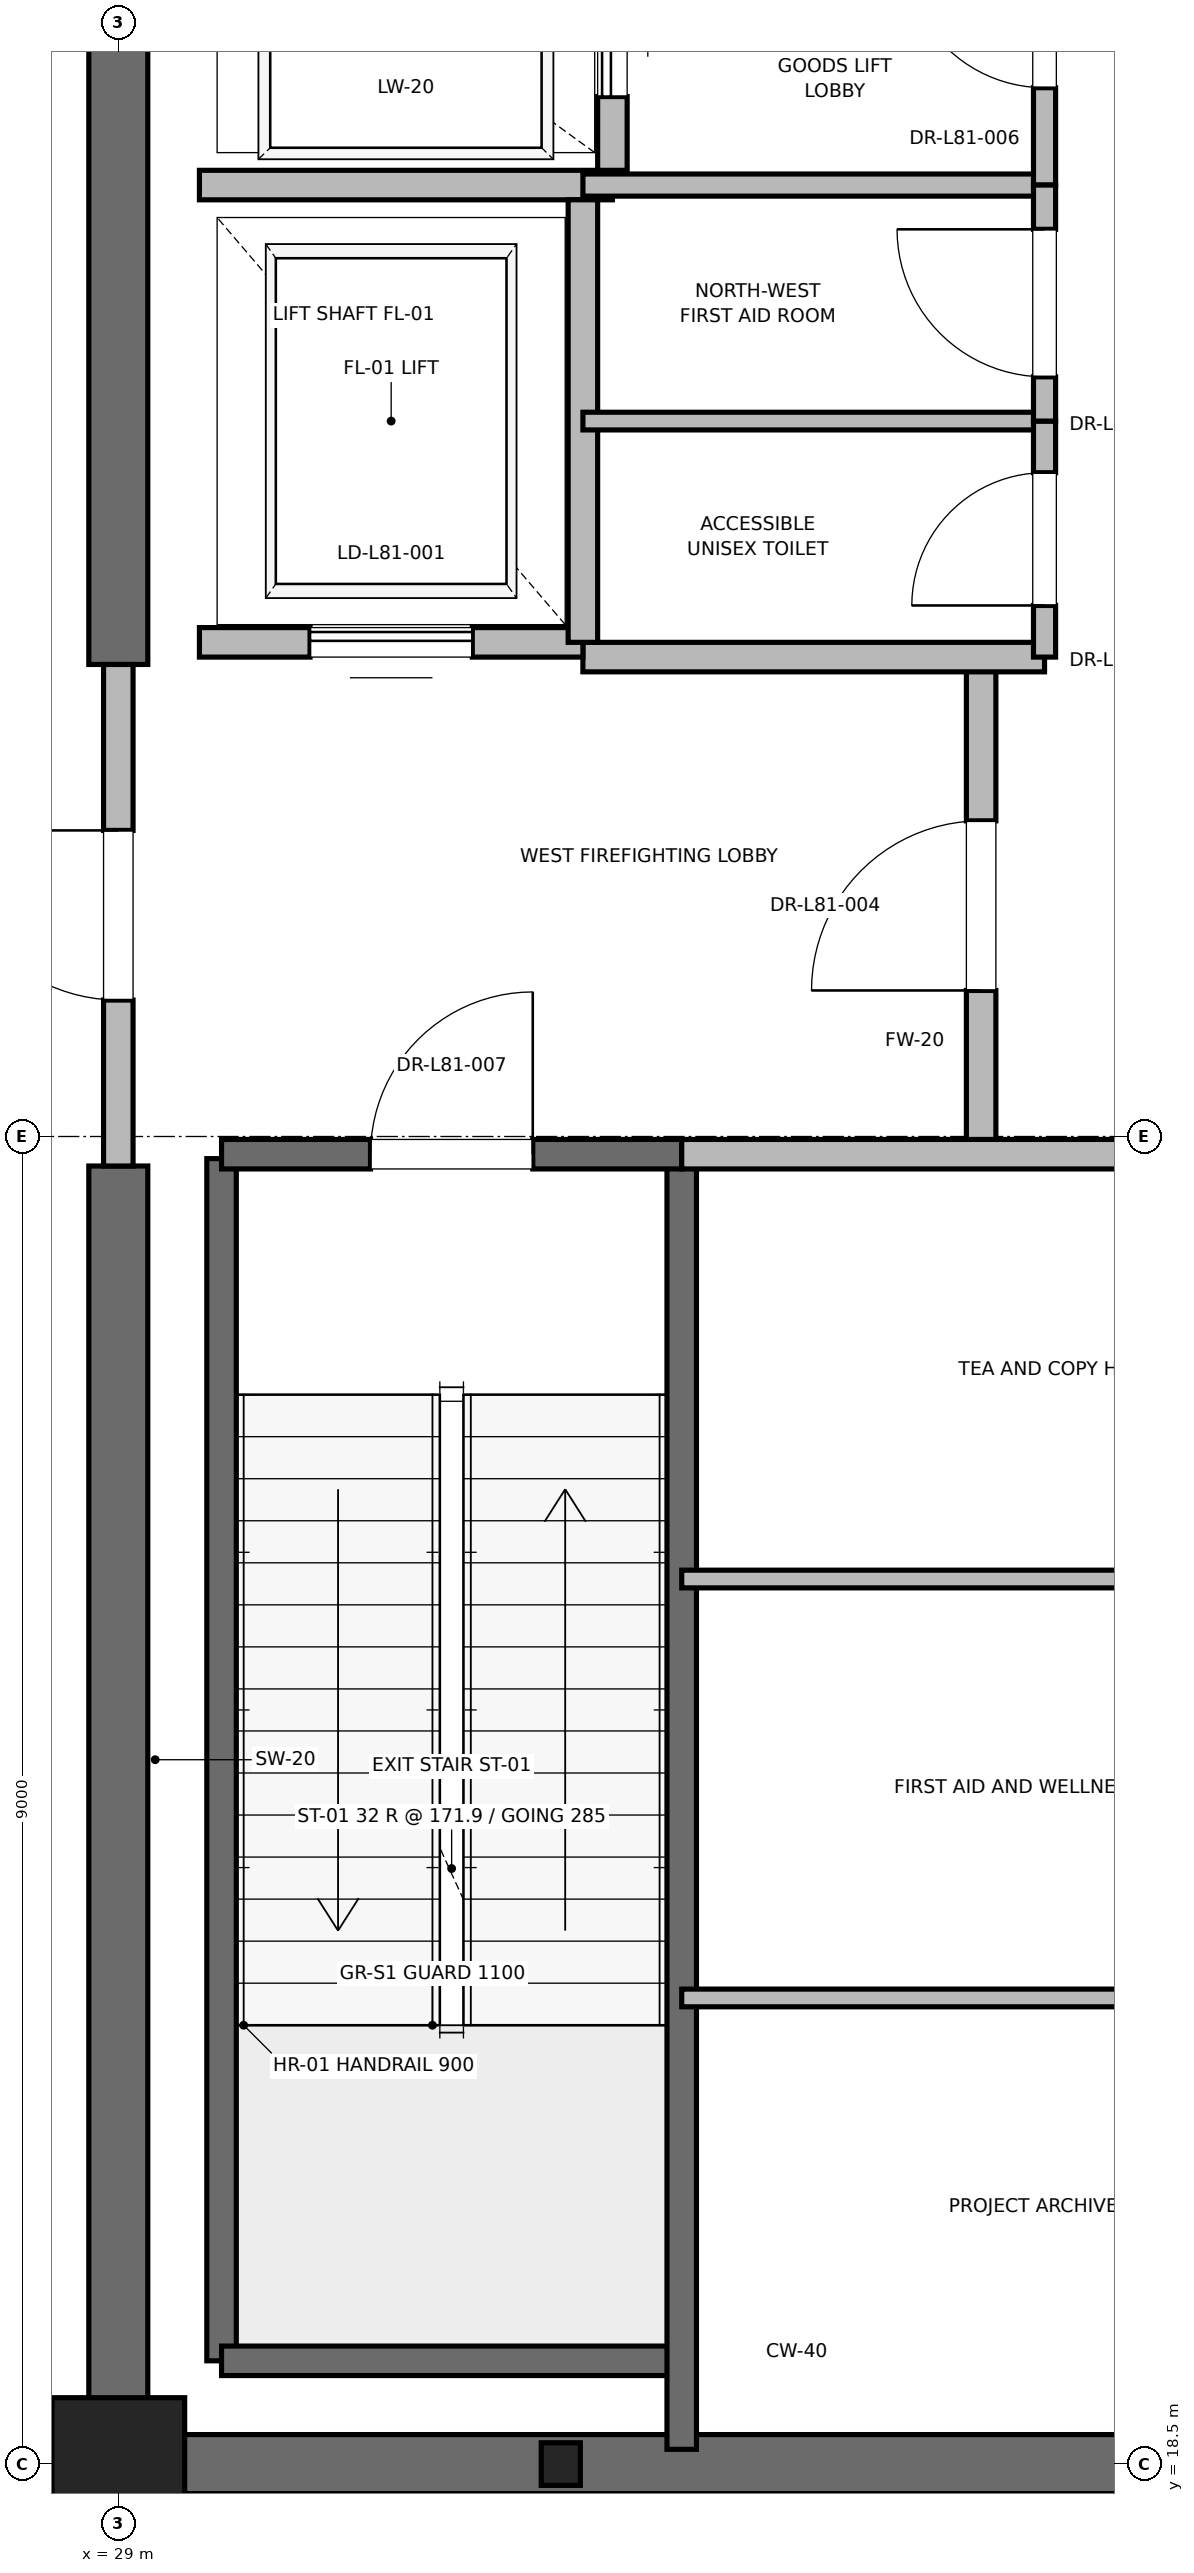
"""IFC4 building model, lengths in metres.
Left out: names, types, materials, properties, quantities, classifications, styles, units other than length and angle.
Written with IfcOpenShell. Run it as: python <this file> out.ifc"""

import sys

from ifc_helpers import new_model, si_unit, direction, frame, frame_2d, origin, origin_2d, place, context, subcontext, project, spatial, rectangle, i_section, extrude, element, fill, save


model = new_model("IFC4")
c1 = context("Model", 3, precision=1e-05, world=origin(), true_north=direction((0.0, 1.0)))
c2 = subcontext(c1, "Body", "Model", "MODEL_VIEW")
j1 = project(units=[si_unit("LENGTHUNIT", "METRE"), si_unit("PLANEANGLEUNIT", "RADIAN")], contexts=[c1])
p1 = place(None, origin())
s1 = spatial("IfcSite", under=j1, at=p1, CompositionType="ELEMENT")
p2 = place(p1, origin())
s2 = spatial("IfcBuilding", under=s1, at=p2, CompositionType="ELEMENT")
p3 = place(p2, frame((0.0, 0.0, 348.8)))
s3 = spatial("IfcBuildingStorey", under=s2, at=p3, CompositionType="ELEMENT", Elevation=348.8)
p4 = place(p3, frame((29.0, 18.5, 0.0), z_axis=(0.0, 0.0, 1.0), x_axis=(1.0, 0.0, 0.0)))
e1 = element("IfcColumn", 1, at=p4, inside=s3, PredefinedType="PILASTER", context=c2, shape_type="SweptSolid", body=[
    extrude(rectangle(XDim=0.9, YDim=0.9, at=origin_2d()), origin(), (0.0, 0.0, 1.0), 5.5),
])
p5 = place(p3, frame((32.0, 18.5, 0.0), z_axis=(0.0, 0.0, 1.0), x_axis=(1.0, 0.0, 0.0)))
e2 = element("IfcColumn", 2, at=p5, inside=s3, PredefinedType="COLUMN", context=c2, shape_type="SweptSolid", body=[
    extrude(i_section(OverallWidth=0.265, OverallDepth=0.289, WebThickness=0.019, FlangeThickness=0.032, FilletRadius=0.013, at=origin_2d()), origin(), (0.0, 0.0, 1.0), 5.5),
])
p6 = place(p3, frame((29.0, 18.5, 0.0), z_axis=(0.0, 0.0, 1.0), x_axis=(1.0, 0.0, 0.0)))
e3 = element("IfcWall", 3, at=p6, inside=s3, PredefinedType="SHEAR", context=c2, shape_type="SweptSolid", body=[
    extrude(rectangle(XDim=9.2, YDim=0.4, at=frame_2d((4.6, 0.0))), origin(), (0.0, 0.0, 1.0), 5.2),
])
p7 = place(p3, frame((29.0, 18.5, 0.0), z_axis=(0.0, 0.0, 1.0), x_axis=(0.0, 1.0, 0.0)))
e4 = element("IfcWall", 4, at=p7, inside=s3, PredefinedType="SHEAR", context=c2, shape_type="SweptSolid", body=[
    extrude(rectangle(XDim=8.8, YDim=0.4, at=frame_2d((4.4, 0.0))), origin(), (0.0, 0.0, 1.0), 5.2),
])
p8 = place(p3, frame((29.0, 30.7, 0.0), z_axis=(0.0, 0.0, 1.0), x_axis=(0.0, 1.0, 0.0)))
e5 = element("IfcWall", 5, at=p8, inside=s3, PredefinedType="SHEAR", context=c2, shape_type="SweptSolid", body=[
    extrude(rectangle(XDim=5.8, YDim=0.4, at=frame_2d((2.9, 0.0))), origin(), (0.0, 0.0, 1.0), 5.2),
])
p9 = place(p3, frame((29.7, 19.2, 0.0), z_axis=(0.0, 0.0, 1.0), x_axis=(0.0, 1.0, 0.0)))
e6 = element("IfcWall", 6, at=p9, inside=s3, PredefinedType="SOLIDWALL", context=c2, shape_type="SweptSolid", body=[
    extrude(rectangle(XDim=8.15, YDim=0.2, at=frame_2d((4.075, 0.0))), origin(), (0.0, 0.0, 1.0), 5.2),
])
p10 = place(p3, frame((29.7, 19.2, 0.0), z_axis=(0.0, 0.0, 1.0), x_axis=(1.0, 0.0, 0.0)))
e7 = element("IfcWall", 7, at=p10, inside=s3, PredefinedType="SOLIDWALL", context=c2, shape_type="SweptSolid", body=[
    extrude(rectangle(XDim=3.12, YDim=0.2, at=frame_2d((1.56, 0.0))), origin(), (0.0, 0.0, 1.0), 5.2),
])
p11 = place(p3, frame((32.82, 18.6, 0.0), z_axis=(0.0, 0.0, 1.0), x_axis=(0.0, 1.0, 0.0)))
e8 = element("IfcWall", 8, at=p11, inside=s3, PredefinedType="SOLIDWALL", context=c2, shape_type="SweptSolid", body=[
    extrude(rectangle(XDim=8.78, YDim=0.2, at=frame_2d((4.39, 0.0))), origin(), (0.0, 0.0, 1.0), 5.2),
])
p12 = place(p3, frame((29.7, 27.38, 0.0), z_axis=(0.0, 0.0, 1.0), x_axis=(1.0, 0.0, 0.0)))
e9 = element("IfcWall", 9, at=p12, inside=s3, PredefinedType="SOLIDWALL", context=c2, shape_type="SweptSolid", body=[
    extrude(rectangle(XDim=3.12, YDim=0.2, at=frame_2d((1.56, 0.0))), origin(), (0.0, 0.0, 1.0), 5.2),
])
p13 = place(p12, frame((1.01, 0.0, 0.0)))
e10 = element("IfcOpeningElement", 10, at=p13, cuts=e9, PredefinedType="OPENING", context=c2, shape_type="SweptSolid", body=[
    extrude(rectangle(XDim=1.1, YDim=2.15, at=frame_2d((0.55, 1.075))), frame((0.0, 0.1, 0.0), z_axis=(0.0, -1.0, 0.0), x_axis=(1.0, 0.0, 0.0)), (0.0, 0.0, 1.0), 0.2),
])
p14 = place(p3, frame((34.85, 27.38, 0.0), z_axis=(0.0, 0.0, 1.0), x_axis=(0.0, 1.0, 0.0)))
e11 = element("IfcWall", 11, at=p14, inside=s3, PredefinedType="PARTITIONING", context=c2, shape_type="SweptSolid", body=[
    extrude(rectangle(XDim=3.37, YDim=0.2, at=frame_2d((1.685, 0.0))), origin(), (0.0, 0.0, 1.0), 5.2),
])
p15 = place(p14, frame((1.11, 0.0, 0.0)))
e12 = element("IfcOpeningElement", 12, at=p15, cuts=e11, PredefinedType="OPENING", context=c2, shape_type="SweptSolid", body=[
    extrude(rectangle(XDim=1.15, YDim=2.2, at=frame_2d((0.575, 1.1))), frame((0.0, 0.1, 0.0), z_axis=(0.0, -1.0, 0.0), x_axis=(1.0, 0.0, 0.0)), (0.0, 0.0, 1.0), 0.2),
])
p16 = place(p3, frame((29.0, 27.3, 0.0), z_axis=(0.0, 0.0, 1.0), x_axis=(0.0, 1.0, 0.0)))
e13 = element("IfcWall", 13, at=p16, inside=s3, PredefinedType="PARTITIONING", context=c2, shape_type="SweptSolid", body=[
    extrude(rectangle(XDim=3.4, YDim=0.2, at=frame_2d((1.7, 0.0))), origin(), (0.0, 0.0, 1.0), 4.28),
])
p17 = place(p16, frame((1.125, 0.0, 0.0)))
e14 = element("IfcOpeningElement", 14, at=p17, cuts=e13, PredefinedType="OPENING", context=c2, shape_type="SweptSolid", body=[
    extrude(rectangle(XDim=1.15, YDim=2.2, at=frame_2d((0.575, 1.1))), frame((0.0, 0.1, 0.0), z_axis=(0.0, -1.0, 0.0), x_axis=(1.0, 0.0, 0.0)), (0.0, 0.0, 1.0), 0.2),
])
p18 = place(p3, frame((32.82, 27.38, 0.0), z_axis=(0.0, 0.0, 1.0), x_axis=(1.0, 0.0, 0.0)))
e15 = element("IfcWall", 15, at=p18, inside=s3, PredefinedType="PARTITIONING", context=c2, shape_type="SweptSolid", body=[
    extrude(rectangle(XDim=5.62, YDim=0.2, at=frame_2d((2.81, 0.0))), origin(), (0.0, 0.0, 1.0), 5.2),
])
p19 = place(p3, frame((32.15, 30.75, 0.0), z_axis=(0.0, 0.0, 1.0), x_axis=(1.0, 0.0, 0.0)))
e16 = element("IfcWall", 16, at=p19, inside=s3, PredefinedType="PARTITIONING", context=c2, shape_type="SweptSolid", body=[
    extrude(rectangle(XDim=3.13, YDim=0.2, at=frame_2d((1.565, 0.0))), origin(), (0.0, 0.0, 1.0), 5.2),
])
p20 = place(p3, frame((29.55, 30.85, 0.0), z_axis=(0.0, 0.0, 1.0), x_axis=(1.0, 0.0, 0.0)))
e17 = element("IfcWall", 17, at=p20, inside=s3, PredefinedType="SOLIDWALL", context=c2, shape_type="SweptSolid", body=[
    extrude(rectangle(XDim=2.6, YDim=0.2, at=frame_2d((1.3, 0.0))), origin(), (0.0, 0.0, 1.0), 4.28),
])
p21 = place(p20, frame((0.75, 0.0, 0.0)))
e18 = element("IfcOpeningElement", 18, at=p21, cuts=e17, PredefinedType="OPENING", context=c2, shape_type="SweptSolid", body=[
    extrude(rectangle(XDim=1.1, YDim=2.2, at=frame_2d((0.55, 1.1))), frame((0.0, 0.1, 0.0), z_axis=(0.0, -1.0, 0.0), x_axis=(1.0, 0.0, 0.0)), (0.0, 0.0, 1.0), 0.2),
])
p22 = place(p3, frame((29.55, 33.95, 0.0), z_axis=(0.0, 0.0, 1.0), x_axis=(1.0, 0.0, 0.0)))
e19 = element("IfcWall", 19, at=p22, inside=s3, PredefinedType="SOLIDWALL", context=c2, shape_type="SweptSolid", body=[
    extrude(rectangle(XDim=2.8, YDim=0.2, at=frame_2d((1.4, 0.0))), origin(), (0.0, 0.0, 1.0), 5.2),
])
p23 = place(p3, frame((32.15, 30.85, 0.0), z_axis=(0.0, 0.0, 1.0), x_axis=(0.0, 1.0, 0.0)))
e20 = element("IfcWall", 20, at=p23, inside=s3, PredefinedType="SOLIDWALL", context=c2, shape_type="SweptSolid", body=[
    extrude(rectangle(XDim=3.0, YDim=0.2, at=frame_2d((1.5, 0.0))), origin(), (0.0, 0.0, 1.0), 5.2),
])
p24 = place(p3, frame((32.35, 34.05, 0.0), z_axis=(0.0, 0.0, 1.0), x_axis=(0.0, 1.0, 0.0)))
e21 = element("IfcWall", 21, at=p24, inside=s3, PredefinedType="SOLIDWALL", context=c2, shape_type="SweptSolid", body=[
    extrude(rectangle(XDim=2.1, YDim=0.2, at=frame_2d((1.05, 0.0))), origin(), (0.0, 0.0, 1.0), 5.2),
])
p25 = place(p24, frame((0.5, 0.0, 0.0)))
e22 = element("IfcOpeningElement", 22, at=p25, cuts=e21, PredefinedType="OPENING", context=c2, shape_type="SweptSolid", body=[
    extrude(rectangle(XDim=1.1, YDim=2.2, at=frame_2d((0.55, 1.1))), frame((0.0, 0.1, 0.0), z_axis=(0.0, -1.0, 0.0), x_axis=(1.0, 0.0, 0.0)), (0.0, 0.0, 1.0), 0.2),
])
p26 = place(p3, frame((32.15, 33.95, 0.0), z_axis=(0.0, 0.0, 1.0), x_axis=(1.0, 0.0, 0.0)))
e23 = element("IfcWall", 23, at=p26, inside=s3, PredefinedType="PARTITIONING", context=c2, shape_type="SweptSolid", body=[
    extrude(rectangle(XDim=3.13, YDim=0.15, at=frame_2d((1.565, 0.0))), origin(), (0.0, 0.0, 1.0), 2.85),
])
p27 = place(p3, frame((35.28, 33.95, 0.0), z_axis=(0.0, 0.0, 1.0), x_axis=(0.0, 1.0, 0.0)))
e24 = element("IfcWall", 24, at=p27, inside=s3, PredefinedType="PARTITIONING", context=c2, shape_type="SweptSolid", body=[
    extrude(rectangle(XDim=2.27, YDim=0.15, at=frame_2d((1.135, 0.0))), origin(), (0.0, 0.0, 1.0), 2.85),
])
p28 = place(p27, frame((0.66, 0.0, 0.0)))
e25 = element("IfcOpeningElement", 25, at=p28, cuts=e24, PredefinedType="OPENING", context=c2, shape_type="SweptSolid", body=[
    extrude(rectangle(XDim=0.95, YDim=2.15, at=frame_2d((0.475, 1.075))), frame((0.0, 0.075, 0.0), z_axis=(0.0, -1.0, 0.0), x_axis=(1.0, 0.0, 0.0)), (0.0, 0.0, 1.0), 0.15),
])
p29 = place(p3, frame((32.15, 32.35, 0.0), z_axis=(0.0, 0.0, 1.0), x_axis=(1.0, 0.0, 0.0)))
e26 = element("IfcWall", 26, at=p29, inside=s3, PredefinedType="PARTITIONING", context=c2, shape_type="SweptSolid", body=[
    extrude(rectangle(XDim=3.13, YDim=0.12, at=frame_2d((1.565, 0.0))), origin(), (0.0, 0.0, 1.0), 2.85),
])
p30 = place(p3, frame((35.28, 30.75, 0.0), z_axis=(0.0, 0.0, 1.0), x_axis=(0.0, 1.0, 0.0)))
e27 = element("IfcWall", 27, at=p30, inside=s3, PredefinedType="PARTITIONING", context=c2, shape_type="SweptSolid", body=[
    extrude(rectangle(XDim=1.6, YDim=0.15, at=frame_2d((0.8, 0.0))), origin(), (0.0, 0.0, 1.0), 2.85),
])
p31 = place(p30, frame((0.35, 0.0, 0.0)))
e28 = element("IfcOpeningElement", 28, at=p31, cuts=e27, PredefinedType="OPENING", context=c2, shape_type="SweptSolid", body=[
    extrude(rectangle(XDim=0.9, YDim=2.1, at=frame_2d((0.45, 1.05))), frame((0.0, 0.075, 0.0), z_axis=(0.0, -1.0, 0.0), x_axis=(1.0, 0.0, 0.0)), (0.0, 0.0, 1.0), 0.15),
])
p32 = place(p3, frame((35.28, 32.35, 0.0), z_axis=(0.0, 0.0, 1.0), x_axis=(0.0, 1.0, 0.0)))
e29 = element("IfcWall", 29, at=p32, inside=s3, PredefinedType="PARTITIONING", context=c2, shape_type="SweptSolid", body=[
    extrude(rectangle(XDim=1.6, YDim=0.15, at=frame_2d((0.8, 0.0))), origin(), (0.0, 0.0, 1.0), 2.85),
])
p33 = place(p32, frame((0.3, 0.0, 0.0)))
e30 = element("IfcOpeningElement", 30, at=p33, cuts=e29, PredefinedType="OPENING", context=c2, shape_type="SweptSolid", body=[
    extrude(rectangle(XDim=1.0, YDim=2.15, at=frame_2d((0.5, 1.075))), frame((0.0, 0.075, 0.0), z_axis=(0.0, -1.0, 0.0), x_axis=(1.0, 0.0, 0.0)), (0.0, 0.0, 1.0), 0.15),
])
for number, where, z_axis, x_axis in (
    (31, (32.82, 21.66, 0.0), (0.0, 0.0, 1.0), (1.0, 0.0, 0.0)),
    (32, (32.82, 24.5, 0.0), (0.0, 0.0, 1.0), (1.0, 0.0, 0.0)),
):
    element("IfcWall", number, at=place(p3, frame(where, z_axis=z_axis, x_axis=x_axis)), inside=s3, PredefinedType="PARTITIONING", context=c2, shape_type="SweptSolid", body=[
        extrude(rectangle(XDim=5.23, YDim=0.12, at=frame_2d((2.615, 0.0))), origin(), (0.0, 0.0, 1.0), 2.85),
    ])
p34 = place(p13, origin())
e33 = element("IfcDoor", 33, at=p34, inside=s3, OperationType="SINGLE_SWING_RIGHT", PredefinedType="DOOR", context=c2, shape_type="SweptSolid", body=[
    extrude(rectangle(XDim=1.1, YDim=2.15, at=frame_2d((0.55, 1.075))), frame((0.0, 0.025, 0.0), z_axis=(0.0, -1.0, 0.0), x_axis=(1.0, 0.0, 0.0)), (0.0, 0.0, 1.0), 0.05),
])
fill(e10, e33)
p35 = place(p15, origin())
e34 = element("IfcDoor", 34, at=p35, inside=s3, OperationType="SINGLE_SWING_LEFT", PredefinedType="DOOR", context=c2, shape_type="SweptSolid", body=[
    extrude(rectangle(XDim=1.15, YDim=2.2, at=frame_2d((0.575, 1.1))), frame((0.0, 0.025, 0.0), z_axis=(0.0, -1.0, 0.0), x_axis=(1.0, 0.0, 0.0)), (0.0, 0.0, 1.0), 0.05),
])
fill(e12, e34)
p36 = place(p17, origin())
e35 = element("IfcDoor", 35, at=p36, inside=s3, OperationType="SINGLE_SWING_RIGHT", PredefinedType="DOOR", context=c2, shape_type="SweptSolid", body=[
    extrude(rectangle(XDim=1.15, YDim=2.2, at=frame_2d((0.575, 1.1))), frame((0.0, 0.025, 0.0), z_axis=(0.0, -1.0, 0.0), x_axis=(1.0, 0.0, 0.0)), (0.0, 0.0, 1.0), 0.05),
])
fill(e14, e35)
p37 = place(p21, origin())
e36 = element("IfcDoor", 36, at=p37, inside=s3, OperationType="SLIDING_TO_RIGHT", PredefinedType="DOOR", context=c2, shape_type="SweptSolid", body=[
    extrude(rectangle(XDim=1.1, YDim=2.2, at=frame_2d((0.55, 1.1))), frame((0.0, 0.025, 0.0), z_axis=(0.0, -1.0, 0.0), x_axis=(1.0, 0.0, 0.0)), (0.0, 0.0, 1.0), 0.05),
])
fill(e18, e36)
p38 = place(p25, origin())
e37 = element("IfcDoor", 37, at=p38, inside=s3, OperationType="SLIDING_TO_RIGHT", PredefinedType="DOOR", context=c2, shape_type="SweptSolid", body=[
    extrude(rectangle(XDim=1.1, YDim=2.2, at=frame_2d((0.55, 1.1))), frame((0.0, 0.025, 0.0), z_axis=(0.0, -1.0, 0.0), x_axis=(1.0, 0.0, 0.0)), (0.0, 0.0, 1.0), 0.05),
])
fill(e22, e37)
p39 = place(p28, origin())
e38 = element("IfcDoor", 38, at=p39, inside=s3, OperationType="SINGLE_SWING_RIGHT", PredefinedType="DOOR", context=c2, shape_type="SweptSolid", body=[
    extrude(rectangle(XDim=0.95, YDim=2.15, at=frame_2d((0.475, 1.075))), frame((0.0, 0.025, 0.0), z_axis=(0.0, -1.0, 0.0), x_axis=(1.0, 0.0, 0.0)), (0.0, 0.0, 1.0), 0.05),
])
fill(e25, e38)
p40 = place(p31, origin())
e39 = element("IfcDoor", 39, at=p40, inside=s3, OperationType="SINGLE_SWING_LEFT", PredefinedType="DOOR", context=c2, shape_type="SweptSolid", body=[
    extrude(rectangle(XDim=0.9, YDim=2.1, at=frame_2d((0.45, 1.05))), frame((0.0, 0.025, 0.0), z_axis=(0.0, -1.0, 0.0), x_axis=(1.0, 0.0, 0.0)), (0.0, 0.0, 1.0), 0.05),
])
fill(e28, e39)
p41 = place(p33, origin())
e40 = element("IfcDoor", 40, at=p41, inside=s3, OperationType="SINGLE_SWING_RIGHT", PredefinedType="DOOR", context=c2, shape_type="SweptSolid", body=[
    extrude(rectangle(XDim=1.0, YDim=2.15, at=frame_2d((0.5, 1.075))), frame((0.0, 0.025, 0.0), z_axis=(0.0, -1.0, 0.0), x_axis=(1.0, 0.0, 0.0)), (0.0, 0.0, 1.0), 0.05),
])
fill(e30, e40)
save(model, sys.argv[1])
